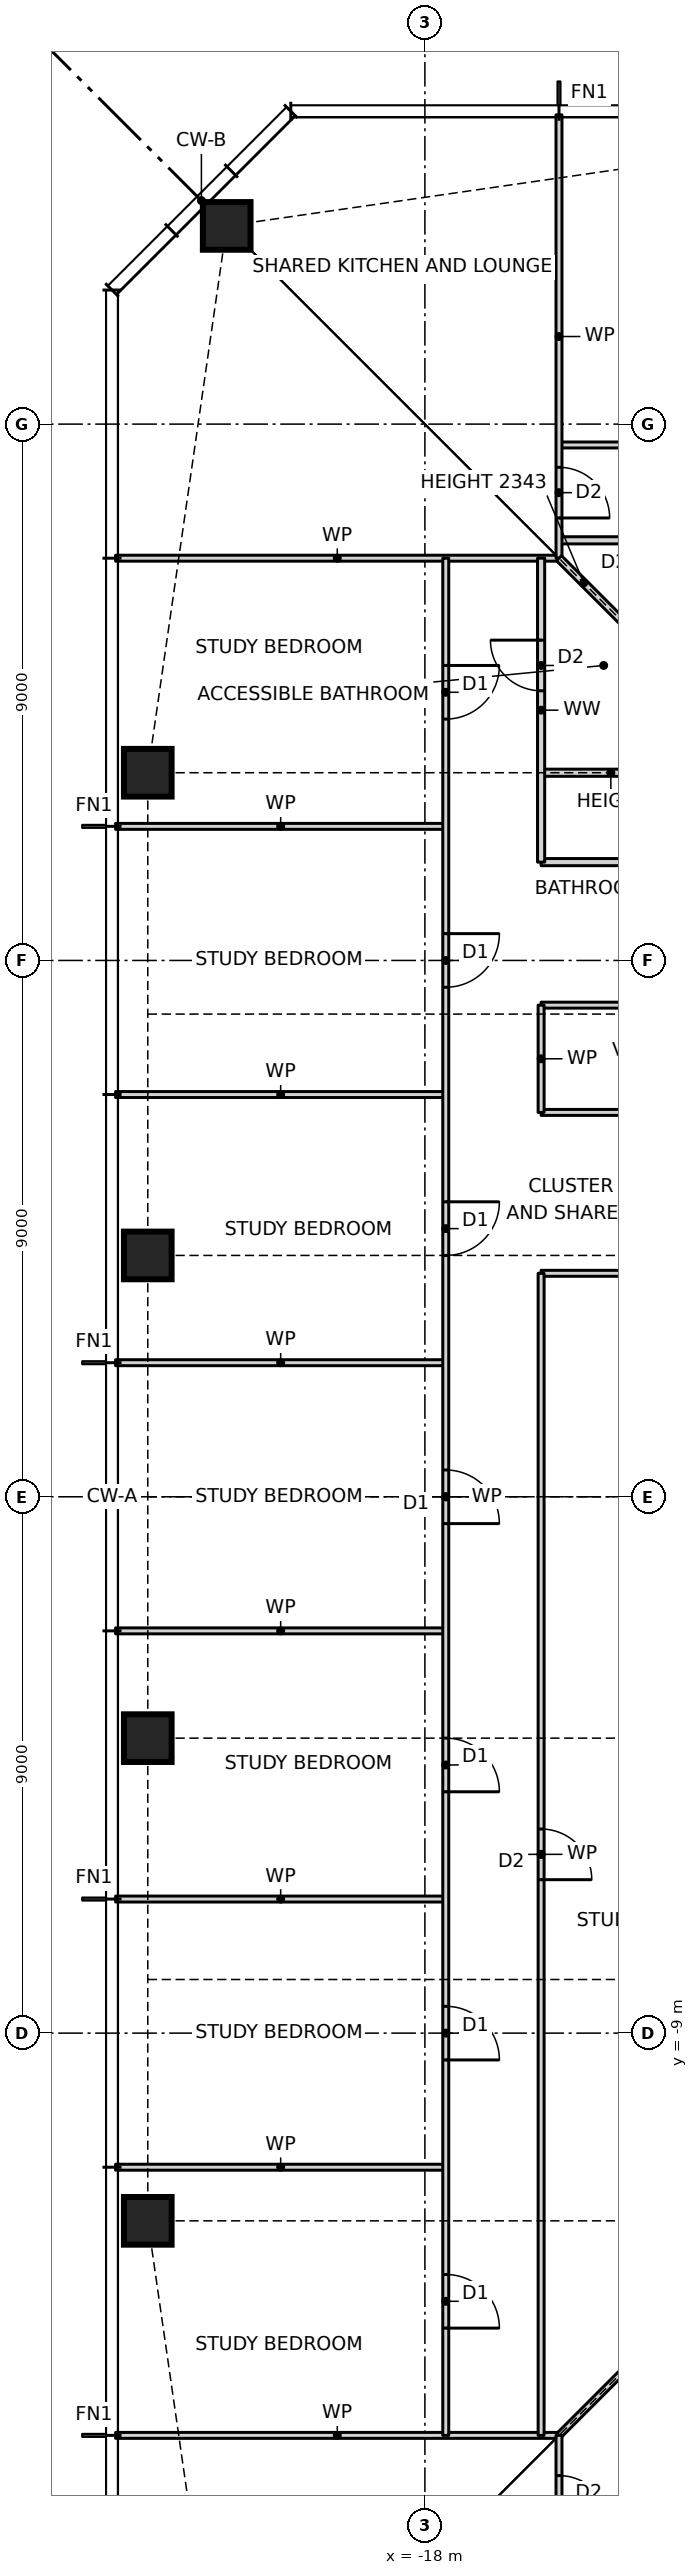
"""IFC4 building model, lengths in metres.
Left out: names, types, materials, properties, quantities, classifications, styles, units other than length and angle.
Written with IfcOpenShell. Run it as: python <this file> out.ifc"""

import sys

from ifc_helpers import new_model, si_unit, direction, frame, frame_2d, origin, origin_2d, place, context, subcontext, project, spatial, rectangle, hollow_rectangle, extrude, element, fill, save


model = new_model("IFC4")
c1 = context("Model", 3, precision=1e-05, world=origin(), true_north=direction((0.0, 1.0)))
c2 = subcontext(c1, "Body", "Model", "MODEL_VIEW")
j1 = project(units=[si_unit("LENGTHUNIT", "METRE"), si_unit("PLANEANGLEUNIT", "RADIAN")], contexts=[c1])
p1 = place(None, origin())
s1 = spatial("IfcSite", under=j1, at=p1, CompositionType="ELEMENT")
p2 = place(p1, origin())
s2 = spatial("IfcBuilding", under=s1, at=p2, CompositionType="ELEMENT")
p3 = place(p2, frame((0.0, 0.0, 15.0)))
s3 = spatial("IfcBuildingStorey", under=s2, at=p3, CompositionType="ELEMENT", Elevation=15.0)
for number, where, z_axis, x_axis in (
    (1, (-21.326, 21.326, 0.0), (0.0, 0.0, 1.0), (1.0, 0.0, 0.0)),
    (2, (-22.65, 12.15, 0.0), (0.0, 0.0, 1.0), (1.0, 0.0, 0.0)),
    (3, (-22.65, 4.05, 0.0), (0.0, 0.0, 1.0), (1.0, 0.0, 0.0)),
    (4, (-22.65, -4.05, 0.0), (0.0, 0.0, 1.0), (1.0, 0.0, 0.0)),
    (5, (-22.65, -12.15, 0.0), (0.0, 0.0, 1.0), (1.0, 0.0, 0.0)),
):
    element("IfcColumn", number, at=place(p3, frame(where, z_axis=z_axis, x_axis=x_axis)), inside=s3, PredefinedType="COLUMN", context=c2, shape_type="SweptSolid", body=[
        extrude(hollow_rectangle(XDim=0.8, YDim=0.8, WallThickness=0.09, at=origin_2d()), origin(), (0.0, 0.0, 1.0), 3.5),
    ])
p4 = place(p3, frame((-23.19, -15.75, 0.0), z_axis=(0.0, 0.0, 1.0), x_axis=(1.0, 0.0, 0.0)))
e6 = element("IfcWall", 6, at=p4, inside=s3, PredefinedType="PARTITIONING", context=c2, shape_type="SweptSolid", body=[
    extrude(rectangle(XDim=7.44, YDim=0.1, at=frame_2d((3.72, 0.0))), origin(), (0.0, 0.0, 1.0), 3.27),
])
for number, where, z_axis, x_axis in (
    (7, (-23.19, -11.25, 0.0), (0.0, 0.0, 1.0), (1.0, 0.0, 0.0)),
    (8, (-23.19, -6.75, 0.0), (0.0, 0.0, 1.0), (1.0, 0.0, 0.0)),
    (9, (-23.19, -2.25, 0.0), (0.0, 0.0, 1.0), (1.0, 0.0, 0.0)),
    (10, (-23.19, 2.25, 0.0), (0.0, 0.0, 1.0), (1.0, 0.0, 0.0)),
):
    element("IfcWall", number, at=place(p3, frame(where, z_axis=z_axis, x_axis=x_axis)), inside=s3, PredefinedType="PARTITIONING", context=c2, shape_type="SweptSolid", body=[
        extrude(rectangle(XDim=5.54, YDim=0.1, at=frame_2d((2.77, 0.0))), origin(), (0.0, 0.0, 1.0), 3.27),
    ])
for number, where, z_axis, x_axis in (
    (11, (-16.05, 3.75, 0.0), (0.0, 0.0, 1.0), (1.0, 0.0, 0.0)),
    (12, (-16.05, 6.45, 0.0), (0.0, 0.0, 1.0), (1.0, 0.0, 0.0)),
):
    element("IfcWall", number, at=place(p3, frame(where, z_axis=z_axis, x_axis=x_axis)), inside=s3, PredefinedType="PARTITIONING", context=c2, shape_type="SweptSolid", body=[
        extrude(rectangle(XDim=4.45, YDim=0.1, at=frame_2d((2.225, 0.0))), origin(), (0.0, 0.0, 1.0), 3.27),
    ])
p5 = place(p3, frame((-23.19, 6.75, 0.0), z_axis=(0.0, 0.0, 1.0), x_axis=(1.0, 0.0, 0.0)))
e13 = element("IfcWall", 13, at=p5, inside=s3, PredefinedType="PARTITIONING", context=c2, shape_type="SweptSolid", body=[
    extrude(rectangle(XDim=5.54, YDim=0.1, at=frame_2d((2.77, 0.0))), origin(), (0.0, 0.0, 1.0), 3.27),
])
p6 = place(p3, frame((-16.05, 8.25, 0.0), z_axis=(0.0, 0.0, 1.0), x_axis=(1.0, 0.0, 0.0)))
e14 = element("IfcWall", 14, at=p6, inside=s3, PredefinedType="PARTITIONING", context=c2, shape_type="SweptSolid", body=[
    extrude(rectangle(XDim=4.45, YDim=0.1, at=frame_2d((2.225, 0.0))), origin(), (0.0, 0.0, 1.0), 3.27),
])
p7 = place(p3, frame((-16.05, 10.65, 0.0), z_axis=(0.0, 0.0, 1.0), x_axis=(1.0, 0.0, 0.0)))
e15 = element("IfcWall", 15, at=p7, inside=s3, PredefinedType="PARTITIONING", context=c2, shape_type="SweptSolid", body=[
    extrude(rectangle(XDim=4.45, YDim=0.12, at=frame_2d((2.225, 0.0))), origin(), (0.0, 0.0, 1.0), 3.27),
])
p8 = place(p7, frame((1.8, 0.0, 0.0)))
e16 = element("IfcOpeningElement", 16, at=p8, cuts=e15, PredefinedType="OPENING", context=c2, shape_type="SweptSolid", body=[
    extrude(rectangle(XDim=0.85, YDim=2.1, at=frame_2d((0.425, 1.05))), frame((0.0, 0.07, 0.0), z_axis=(0.0, -1.0, 0.0), x_axis=(1.0, 0.0, 0.0)), (0.0, 0.0, 1.0), 0.14),
])
p9 = place(p3, frame((-23.19, 11.25, 0.0), z_axis=(0.0, 0.0, 1.0), x_axis=(1.0, 0.0, 0.0)))
e17 = element("IfcWall", 17, at=p9, inside=s3, PredefinedType="PARTITIONING", context=c2, shape_type="SweptSolid", body=[
    extrude(rectangle(XDim=5.54, YDim=0.1, at=frame_2d((2.77, 0.0))), origin(), (0.0, 0.0, 1.0), 3.27),
])
p10 = place(p3, frame((-16.05, 12.15, 0.0), z_axis=(0.0, 0.0, 1.0), x_axis=(1.0, 0.0, 0.0)))
e18 = element("IfcWall", 18, at=p10, inside=s3, PredefinedType="PARTITIONING", context=c2, shape_type="SweptSolid", body=[
    extrude(rectangle(XDim=3.9, YDim=0.12, at=frame_2d((1.95, 0.0))), origin(), (0.0, 0.0, 1.0), 2.508),
])
p11 = place(p3, frame((-23.19, 15.75, 0.0), z_axis=(0.0, 0.0, 1.0), x_axis=(1.0, 0.0, 0.0)))
e19 = element("IfcWall", 19, at=p11, inside=s3, PredefinedType="PARTITIONING", context=c2, shape_type="SweptSolid", body=[
    extrude(rectangle(XDim=7.44, YDim=0.1, at=frame_2d((3.72, 0.0))), origin(), (0.0, 0.0, 1.0), 3.27),
])
p12 = place(p3, frame((-15.75, 16.05, 0.0), z_axis=(0.0, 0.0, 1.0), x_axis=(1.0, 0.0, 0.0)))
e20 = element("IfcWall", 20, at=p12, inside=s3, PredefinedType="PARTITIONING", context=c2, shape_type="SweptSolid", body=[
    extrude(rectangle(XDim=5.1, YDim=0.12, at=frame_2d((2.55, 0.0))), origin(), (0.0, 0.0, 1.0), 3.27),
])
p13 = place(p12, frame((1.375, 0.0, 0.0)))
e21 = element("IfcOpeningElement", 21, at=p13, cuts=e20, PredefinedType="OPENING", context=c2, shape_type="SweptSolid", body=[
    extrude(rectangle(XDim=0.85, YDim=2.1, at=frame_2d((0.425, 1.05))), frame((0.0, 0.07, 0.0), z_axis=(0.0, -1.0, 0.0), x_axis=(1.0, 0.0, 0.0)), (0.0, 0.0, 1.0), 0.14),
])
p14 = place(p3, frame((-15.75, 17.65, 0.0), z_axis=(0.0, 0.0, 1.0), x_axis=(1.0, 0.0, 0.0)))
e22 = element("IfcWall", 22, at=p14, inside=s3, PredefinedType="PARTITIONING", context=c2, shape_type="SweptSolid", body=[
    extrude(rectangle(XDim=31.5, YDim=0.1, at=frame_2d((15.75, 0.0))), origin(), (0.0, 0.0, 1.0), 3.27),
])
p15 = place(p14, frame((28.8, 0.0, 0.0)))
e23 = element("IfcOpeningElement", 23, at=p15, cuts=e22, PredefinedType="OPENING", context=c2, shape_type="SweptSolid", body=[
    extrude(rectangle(XDim=0.9, YDim=2.1, at=frame_2d((0.45, 1.05))), frame((0.0, 0.06, 0.0), z_axis=(0.0, -1.0, 0.0), x_axis=(1.0, 0.0, 0.0)), (0.0, 0.0, 1.0), 0.12),
])
p16 = place(p14, frame((24.3, 0.0, 0.0)))
e24 = element("IfcOpeningElement", 24, at=p16, cuts=e22, PredefinedType="OPENING", context=c2, shape_type="SweptSolid", body=[
    extrude(rectangle(XDim=0.9, YDim=2.1, at=frame_2d((0.45, 1.05))), frame((0.0, 0.06, 0.0), z_axis=(0.0, -1.0, 0.0), x_axis=(1.0, 0.0, 0.0)), (0.0, 0.0, 1.0), 0.12),
])
p17 = place(p14, frame((19.8, 0.0, 0.0)))
e25 = element("IfcOpeningElement", 25, at=p17, cuts=e22, PredefinedType="OPENING", context=c2, shape_type="SweptSolid", body=[
    extrude(rectangle(XDim=0.9, YDim=2.1, at=frame_2d((0.45, 1.05))), frame((0.0, 0.06, 0.0), z_axis=(0.0, -1.0, 0.0), x_axis=(1.0, 0.0, 0.0)), (0.0, 0.0, 1.0), 0.12),
])
p18 = place(p14, frame((15.3, 0.0, 0.0)))
e26 = element("IfcOpeningElement", 26, at=p18, cuts=e22, PredefinedType="OPENING", context=c2, shape_type="SweptSolid", body=[
    extrude(rectangle(XDim=0.9, YDim=2.1, at=frame_2d((0.45, 1.05))), frame((0.0, 0.06, 0.0), z_axis=(0.0, -1.0, 0.0), x_axis=(1.0, 0.0, 0.0)), (0.0, 0.0, 1.0), 0.12),
])
p19 = place(p14, frame((10.8, 0.0, 0.0)))
e27 = element("IfcOpeningElement", 27, at=p19, cuts=e22, PredefinedType="OPENING", context=c2, shape_type="SweptSolid", body=[
    extrude(rectangle(XDim=0.9, YDim=2.1, at=frame_2d((0.45, 1.05))), frame((0.0, 0.06, 0.0), z_axis=(0.0, -1.0, 0.0), x_axis=(1.0, 0.0, 0.0)), (0.0, 0.0, 1.0), 0.12),
])
p20 = place(p14, frame((6.3, 0.0, 0.0)))
e28 = element("IfcOpeningElement", 28, at=p20, cuts=e22, PredefinedType="OPENING", context=c2, shape_type="SweptSolid", body=[
    extrude(rectangle(XDim=0.9, YDim=2.1, at=frame_2d((0.45, 1.05))), frame((0.0, 0.06, 0.0), z_axis=(0.0, -1.0, 0.0), x_axis=(1.0, 0.0, 0.0)), (0.0, 0.0, 1.0), 0.12),
])
p21 = place(p14, frame((1.8, 0.0, 0.0)))
e29 = element("IfcOpeningElement", 29, at=p21, cuts=e22, PredefinedType="OPENING", context=c2, shape_type="SweptSolid", body=[
    extrude(rectangle(XDim=0.9, YDim=2.1, at=frame_2d((0.45, 1.05))), frame((0.0, 0.06, 0.0), z_axis=(0.0, -1.0, 0.0), x_axis=(1.0, 0.0, 0.0)), (0.0, 0.0, 1.0), 0.12),
])
p22 = place(p3, frame((-15.75, -15.75, 0.0), z_axis=(0.0, 0.0, 1.0), x_axis=(0.707106781187, 0.707106781187, 0.0)))
e30 = element("IfcWall", 30, at=p22, inside=s3, PredefinedType="PARTITIONING", context=c2, shape_type="SweptSolid", body=[
    extrude(rectangle(XDim=5.869, YDim=0.1, at=frame_2d((2.935, 0.0))), origin(), (0.0, 0.0, 1.0), 2.343),
])
p23 = place(p3, frame((-15.75, -23.19, 0.0), z_axis=(0.0, 0.0, 1.0), x_axis=(0.0, 1.0, 0.0)))
e31 = element("IfcWall", 31, at=p23, inside=s3, PredefinedType="PARTITIONING", context=c2, shape_type="SweptSolid", body=[
    extrude(rectangle(XDim=7.44, YDim=0.1, at=frame_2d((3.72, 0.0))), origin(), (0.0, 0.0, 1.0), 3.27),
])
p24 = place(p23, frame((5.915, 0.0, 0.0)))
e32 = element("IfcOpeningElement", 32, at=p24, cuts=e31, PredefinedType="OPENING", context=c2, shape_type="SweptSolid", body=[
    extrude(rectangle(XDim=0.85, YDim=2.1, at=frame_2d((0.425, 1.05))), frame((0.0, 0.06, 0.0), z_axis=(0.0, -1.0, 0.0), x_axis=(1.0, 0.0, 0.0)), (0.0, 0.0, 1.0), 0.12),
])
p25 = place(p3, frame((-15.75, 15.75, 0.0), z_axis=(0.0, 0.0, 1.0), x_axis=(0.0, 1.0, 0.0)))
e33 = element("IfcWall", 33, at=p25, inside=s3, PredefinedType="PARTITIONING", context=c2, shape_type="SweptSolid", body=[
    extrude(rectangle(XDim=7.44, YDim=0.1, at=frame_2d((3.72, 0.0))), origin(), (0.0, 0.0, 1.0), 3.27),
])
p26 = place(p25, frame((0.675, 0.0, 0.0)))
e34 = element("IfcOpeningElement", 34, at=p26, cuts=e33, PredefinedType="OPENING", context=c2, shape_type="SweptSolid", body=[
    extrude(rectangle(XDim=0.85, YDim=2.1, at=frame_2d((0.425, 1.05))), frame((0.0, 0.06, 0.0), z_axis=(0.0, -1.0, 0.0), x_axis=(1.0, 0.0, 0.0)), (0.0, 0.0, 1.0), 0.12),
])
p27 = place(p3, frame((-16.05, -15.75, 0.0), z_axis=(0.0, 0.0, 1.0), x_axis=(0.0, 1.0, 0.0)))
e35 = element("IfcWall", 35, at=p27, inside=s3, PredefinedType="PARTITIONING", context=c2, shape_type="SweptSolid", body=[
    extrude(rectangle(XDim=19.5, YDim=0.1, at=frame_2d((9.75, 0.0))), origin(), (0.0, 0.0, 1.0), 3.27),
])
p28 = place(p27, frame((9.325, 0.0, 0.0)))
e36 = element("IfcOpeningElement", 36, at=p28, cuts=e35, PredefinedType="OPENING", context=c2, shape_type="SweptSolid", body=[
    extrude(rectangle(XDim=0.85, YDim=2.1, at=frame_2d((0.425, 1.05))), frame((0.0, 0.06, 0.0), z_axis=(0.0, -1.0, 0.0), x_axis=(1.0, 0.0, 0.0)), (0.0, 0.0, 1.0), 0.12),
])
p29 = place(p3, frame((-16.05, 6.45, 0.0), z_axis=(0.0, 0.0, 1.0), x_axis=(0.0, 1.0, 0.0)))
e37 = element("IfcWall", 37, at=p29, inside=s3, PredefinedType="PARTITIONING", context=c2, shape_type="SweptSolid", body=[
    extrude(rectangle(XDim=1.8, YDim=0.1, at=frame_2d((0.9, 0.0))), origin(), (0.0, 0.0, 1.0), 3.27),
])
p30 = place(p3, frame((-16.05, 10.65, 0.0), z_axis=(0.0, 0.0, 1.0), x_axis=(0.0, 1.0, 0.0)))
e38 = element("IfcWall", 38, at=p30, inside=s3, PredefinedType="PARTITIONING", context=c2, shape_type="SweptSolid", body=[
    extrude(rectangle(XDim=5.1, YDim=0.12, at=frame_2d((2.55, 0.0))), origin(), (0.0, 0.0, 1.0), 3.27),
])
p31 = place(p30, frame((2.875, 0.0, 0.0)))
e39 = element("IfcOpeningElement", 39, at=p31, cuts=e38, PredefinedType="OPENING", context=c2, shape_type="SweptSolid", body=[
    extrude(rectangle(XDim=0.85, YDim=2.1, at=frame_2d((0.425, 1.05))), frame((0.0, 0.07, 0.0), z_axis=(0.0, -1.0, 0.0), x_axis=(1.0, 0.0, 0.0)), (0.0, 0.0, 1.0), 0.14),
])
p32 = place(p3, frame((-17.65, -15.75, 0.0), z_axis=(0.0, 0.0, 1.0), x_axis=(0.0, 1.0, 0.0)))
e40 = element("IfcWall", 40, at=p32, inside=s3, PredefinedType="PARTITIONING", context=c2, shape_type="SweptSolid", body=[
    extrude(rectangle(XDim=31.5, YDim=0.1, at=frame_2d((15.75, 0.0))), origin(), (0.0, 0.0, 1.0), 3.27),
])
p33 = place(p32, frame((28.8, 0.0, 0.0)))
e41 = element("IfcOpeningElement", 41, at=p33, cuts=e40, PredefinedType="OPENING", context=c2, shape_type="SweptSolid", body=[
    extrude(rectangle(XDim=0.9, YDim=2.1, at=frame_2d((0.45, 1.05))), frame((0.0, 0.06, 0.0), z_axis=(0.0, -1.0, 0.0), x_axis=(1.0, 0.0, 0.0)), (0.0, 0.0, 1.0), 0.12),
])
p34 = place(p32, frame((24.3, 0.0, 0.0)))
e42 = element("IfcOpeningElement", 42, at=p34, cuts=e40, PredefinedType="OPENING", context=c2, shape_type="SweptSolid", body=[
    extrude(rectangle(XDim=0.9, YDim=2.1, at=frame_2d((0.45, 1.05))), frame((0.0, 0.06, 0.0), z_axis=(0.0, -1.0, 0.0), x_axis=(1.0, 0.0, 0.0)), (0.0, 0.0, 1.0), 0.12),
])
p35 = place(p32, frame((19.8, 0.0, 0.0)))
e43 = element("IfcOpeningElement", 43, at=p35, cuts=e40, PredefinedType="OPENING", context=c2, shape_type="SweptSolid", body=[
    extrude(rectangle(XDim=0.9, YDim=2.1, at=frame_2d((0.45, 1.05))), frame((0.0, 0.06, 0.0), z_axis=(0.0, -1.0, 0.0), x_axis=(1.0, 0.0, 0.0)), (0.0, 0.0, 1.0), 0.12),
])
p36 = place(p32, frame((15.3, 0.0, 0.0)))
e44 = element("IfcOpeningElement", 44, at=p36, cuts=e40, PredefinedType="OPENING", context=c2, shape_type="SweptSolid", body=[
    extrude(rectangle(XDim=0.9, YDim=2.1, at=frame_2d((0.45, 1.05))), frame((0.0, 0.06, 0.0), z_axis=(0.0, -1.0, 0.0), x_axis=(1.0, 0.0, 0.0)), (0.0, 0.0, 1.0), 0.12),
])
p37 = place(p32, frame((10.8, 0.0, 0.0)))
e45 = element("IfcOpeningElement", 45, at=p37, cuts=e40, PredefinedType="OPENING", context=c2, shape_type="SweptSolid", body=[
    extrude(rectangle(XDim=0.9, YDim=2.1, at=frame_2d((0.45, 1.05))), frame((0.0, 0.06, 0.0), z_axis=(0.0, -1.0, 0.0), x_axis=(1.0, 0.0, 0.0)), (0.0, 0.0, 1.0), 0.12),
])
p38 = place(p32, frame((6.3, 0.0, 0.0)))
e46 = element("IfcOpeningElement", 46, at=p38, cuts=e40, PredefinedType="OPENING", context=c2, shape_type="SweptSolid", body=[
    extrude(rectangle(XDim=0.9, YDim=2.1, at=frame_2d((0.45, 1.05))), frame((0.0, 0.06, 0.0), z_axis=(0.0, -1.0, 0.0), x_axis=(1.0, 0.0, 0.0)), (0.0, 0.0, 1.0), 0.12),
])
p39 = place(p32, frame((1.8, 0.0, 0.0)))
e47 = element("IfcOpeningElement", 47, at=p39, cuts=e40, PredefinedType="OPENING", context=c2, shape_type="SweptSolid", body=[
    extrude(rectangle(XDim=0.9, YDim=2.1, at=frame_2d((0.45, 1.05))), frame((0.0, 0.06, 0.0), z_axis=(0.0, -1.0, 0.0), x_axis=(1.0, 0.0, 0.0)), (0.0, 0.0, 1.0), 0.12),
])
p40 = place(p3, frame((-11.6, 11.6, 0.0), z_axis=(0.0, 0.0, 1.0), x_axis=(-0.707106781187, 0.707106781187, 0.0)))
e48 = element("IfcWall", 48, at=p40, inside=s3, PredefinedType="PARTITIONING", context=c2, shape_type="SweptSolid", body=[
    extrude(rectangle(XDim=5.869, YDim=0.12, at=frame_2d((2.935, 0.0))), origin(), (0.0, 0.0, 1.0), 2.343),
])
p41 = place(p33, frame((0.9, 0.0, 0.0), z_axis=(0.0, 0.0, 1.0), x_axis=(-1.0, 0.0, 0.0)))
e49 = element("IfcDoor", 49, at=p41, inside=s3, OperationType="SINGLE_SWING_LEFT", PredefinedType="DOOR", context=c2, shape_type="SweptSolid", body=[
    extrude(rectangle(XDim=0.9, YDim=2.1, at=frame_2d((0.45, 1.05))), frame((0.0, 0.025, 0.0), z_axis=(0.0, -1.0, 0.0), x_axis=(1.0, 0.0, 0.0)), (0.0, 0.0, 1.0), 0.05),
])
fill(e41, e49)
p42 = place(p34, frame((0.9, 0.0, 0.0), z_axis=(0.0, 0.0, 1.0), x_axis=(-1.0, 0.0, 0.0)))
e50 = element("IfcDoor", 50, at=p42, inside=s3, OperationType="SINGLE_SWING_LEFT", PredefinedType="DOOR", context=c2, shape_type="SweptSolid", body=[
    extrude(rectangle(XDim=0.9, YDim=2.1, at=frame_2d((0.45, 1.05))), frame((0.0, 0.025, 0.0), z_axis=(0.0, -1.0, 0.0), x_axis=(1.0, 0.0, 0.0)), (0.0, 0.0, 1.0), 0.05),
])
fill(e42, e50)
p43 = place(p35, frame((0.9, 0.0, 0.0), z_axis=(0.0, 0.0, 1.0), x_axis=(-1.0, 0.0, 0.0)))
e51 = element("IfcDoor", 51, at=p43, inside=s3, OperationType="SINGLE_SWING_LEFT", PredefinedType="DOOR", context=c2, shape_type="SweptSolid", body=[
    extrude(rectangle(XDim=0.9, YDim=2.1, at=frame_2d((0.45, 1.05))), frame((0.0, 0.025, 0.0), z_axis=(0.0, -1.0, 0.0), x_axis=(1.0, 0.0, 0.0)), (0.0, 0.0, 1.0), 0.05),
])
fill(e43, e51)
p44 = place(p36, frame((0.9, 0.0, 0.0), z_axis=(0.0, 0.0, 1.0), x_axis=(-1.0, 0.0, 0.0)))
e52 = element("IfcDoor", 52, at=p44, inside=s3, OperationType="SINGLE_SWING_RIGHT", PredefinedType="DOOR", context=c2, shape_type="SweptSolid", body=[
    extrude(rectangle(XDim=0.9, YDim=2.1, at=frame_2d((0.45, 1.05))), frame((0.0, 0.025, 0.0), z_axis=(0.0, -1.0, 0.0), x_axis=(1.0, 0.0, 0.0)), (0.0, 0.0, 1.0), 0.05),
])
fill(e44, e52)
p45 = place(p37, frame((0.9, 0.0, 0.0), z_axis=(0.0, 0.0, 1.0), x_axis=(-1.0, 0.0, 0.0)))
e53 = element("IfcDoor", 53, at=p45, inside=s3, OperationType="SINGLE_SWING_RIGHT", PredefinedType="DOOR", context=c2, shape_type="SweptSolid", body=[
    extrude(rectangle(XDim=0.9, YDim=2.1, at=frame_2d((0.45, 1.05))), frame((0.0, 0.025, 0.0), z_axis=(0.0, -1.0, 0.0), x_axis=(1.0, 0.0, 0.0)), (0.0, 0.0, 1.0), 0.05),
])
fill(e45, e53)
p46 = place(p38, frame((0.9, 0.0, 0.0), z_axis=(0.0, 0.0, 1.0), x_axis=(-1.0, 0.0, 0.0)))
e54 = element("IfcDoor", 54, at=p46, inside=s3, OperationType="SINGLE_SWING_RIGHT", PredefinedType="DOOR", context=c2, shape_type="SweptSolid", body=[
    extrude(rectangle(XDim=0.9, YDim=2.1, at=frame_2d((0.45, 1.05))), frame((0.0, 0.025, 0.0), z_axis=(0.0, -1.0, 0.0), x_axis=(1.0, 0.0, 0.0)), (0.0, 0.0, 1.0), 0.05),
])
fill(e46, e54)
p47 = place(p39, frame((0.9, 0.0, 0.0), z_axis=(0.0, 0.0, 1.0), x_axis=(-1.0, 0.0, 0.0)))
e55 = element("IfcDoor", 55, at=p47, inside=s3, OperationType="SINGLE_SWING_RIGHT", PredefinedType="DOOR", context=c2, shape_type="SweptSolid", body=[
    extrude(rectangle(XDim=0.9, YDim=2.1, at=frame_2d((0.45, 1.05))), frame((0.0, 0.025, 0.0), z_axis=(0.0, -1.0, 0.0), x_axis=(1.0, 0.0, 0.0)), (0.0, 0.0, 1.0), 0.05),
])
fill(e47, e55)
p48 = place(p31, origin())
e56 = element("IfcDoor", 56, at=p48, inside=s3, OperationType="SINGLE_SWING_RIGHT", PredefinedType="DOOR", context=c2, shape_type="SweptSolid", body=[
    extrude(rectangle(XDim=0.85, YDim=2.1, at=frame_2d((0.425, 1.05))), frame((0.0, 0.025, 0.0), z_axis=(0.0, -1.0, 0.0), x_axis=(1.0, 0.0, 0.0)), (0.0, 0.0, 1.0), 0.05),
])
fill(e39, e56)
p49 = place(p28, frame((0.85, 0.0, 0.0), z_axis=(0.0, 0.0, 1.0), x_axis=(-1.0, 0.0, 0.0)))
e57 = element("IfcDoor", 57, at=p49, inside=s3, OperationType="SINGLE_SWING_RIGHT", PredefinedType="DOOR", context=c2, shape_type="SweptSolid", body=[
    extrude(rectangle(XDim=0.85, YDim=2.1, at=frame_2d((0.425, 1.05))), frame((0.0, 0.025, 0.0), z_axis=(0.0, -1.0, 0.0), x_axis=(1.0, 0.0, 0.0)), (0.0, 0.0, 1.0), 0.05),
])
fill(e36, e57)
p50 = place(p24, frame((0.85, 0.0, 0.0), z_axis=(0.0, 0.0, 1.0), x_axis=(-1.0, 0.0, 0.0)))
e58 = element("IfcDoor", 58, at=p50, inside=s3, OperationType="SINGLE_SWING_RIGHT", PredefinedType="DOOR", context=c2, shape_type="SweptSolid", body=[
    extrude(rectangle(XDim=0.85, YDim=2.1, at=frame_2d((0.425, 1.05))), frame((0.0, 0.025, 0.0), z_axis=(0.0, -1.0, 0.0), x_axis=(1.0, 0.0, 0.0)), (0.0, 0.0, 1.0), 0.05),
])
fill(e32, e58)
p51 = place(p26, frame((0.85, 0.0, 0.0), z_axis=(0.0, 0.0, 1.0), x_axis=(-1.0, 0.0, 0.0)))
e59 = element("IfcDoor", 59, at=p51, inside=s3, OperationType="SINGLE_SWING_RIGHT", PredefinedType="DOOR", context=c2, shape_type="SweptSolid", body=[
    extrude(rectangle(XDim=0.85, YDim=2.1, at=frame_2d((0.425, 1.05))), frame((0.0, 0.025, 0.0), z_axis=(0.0, -1.0, 0.0), x_axis=(1.0, 0.0, 0.0)), (0.0, 0.0, 1.0), 0.05),
])
fill(e34, e59)
save(model, sys.argv[1])
